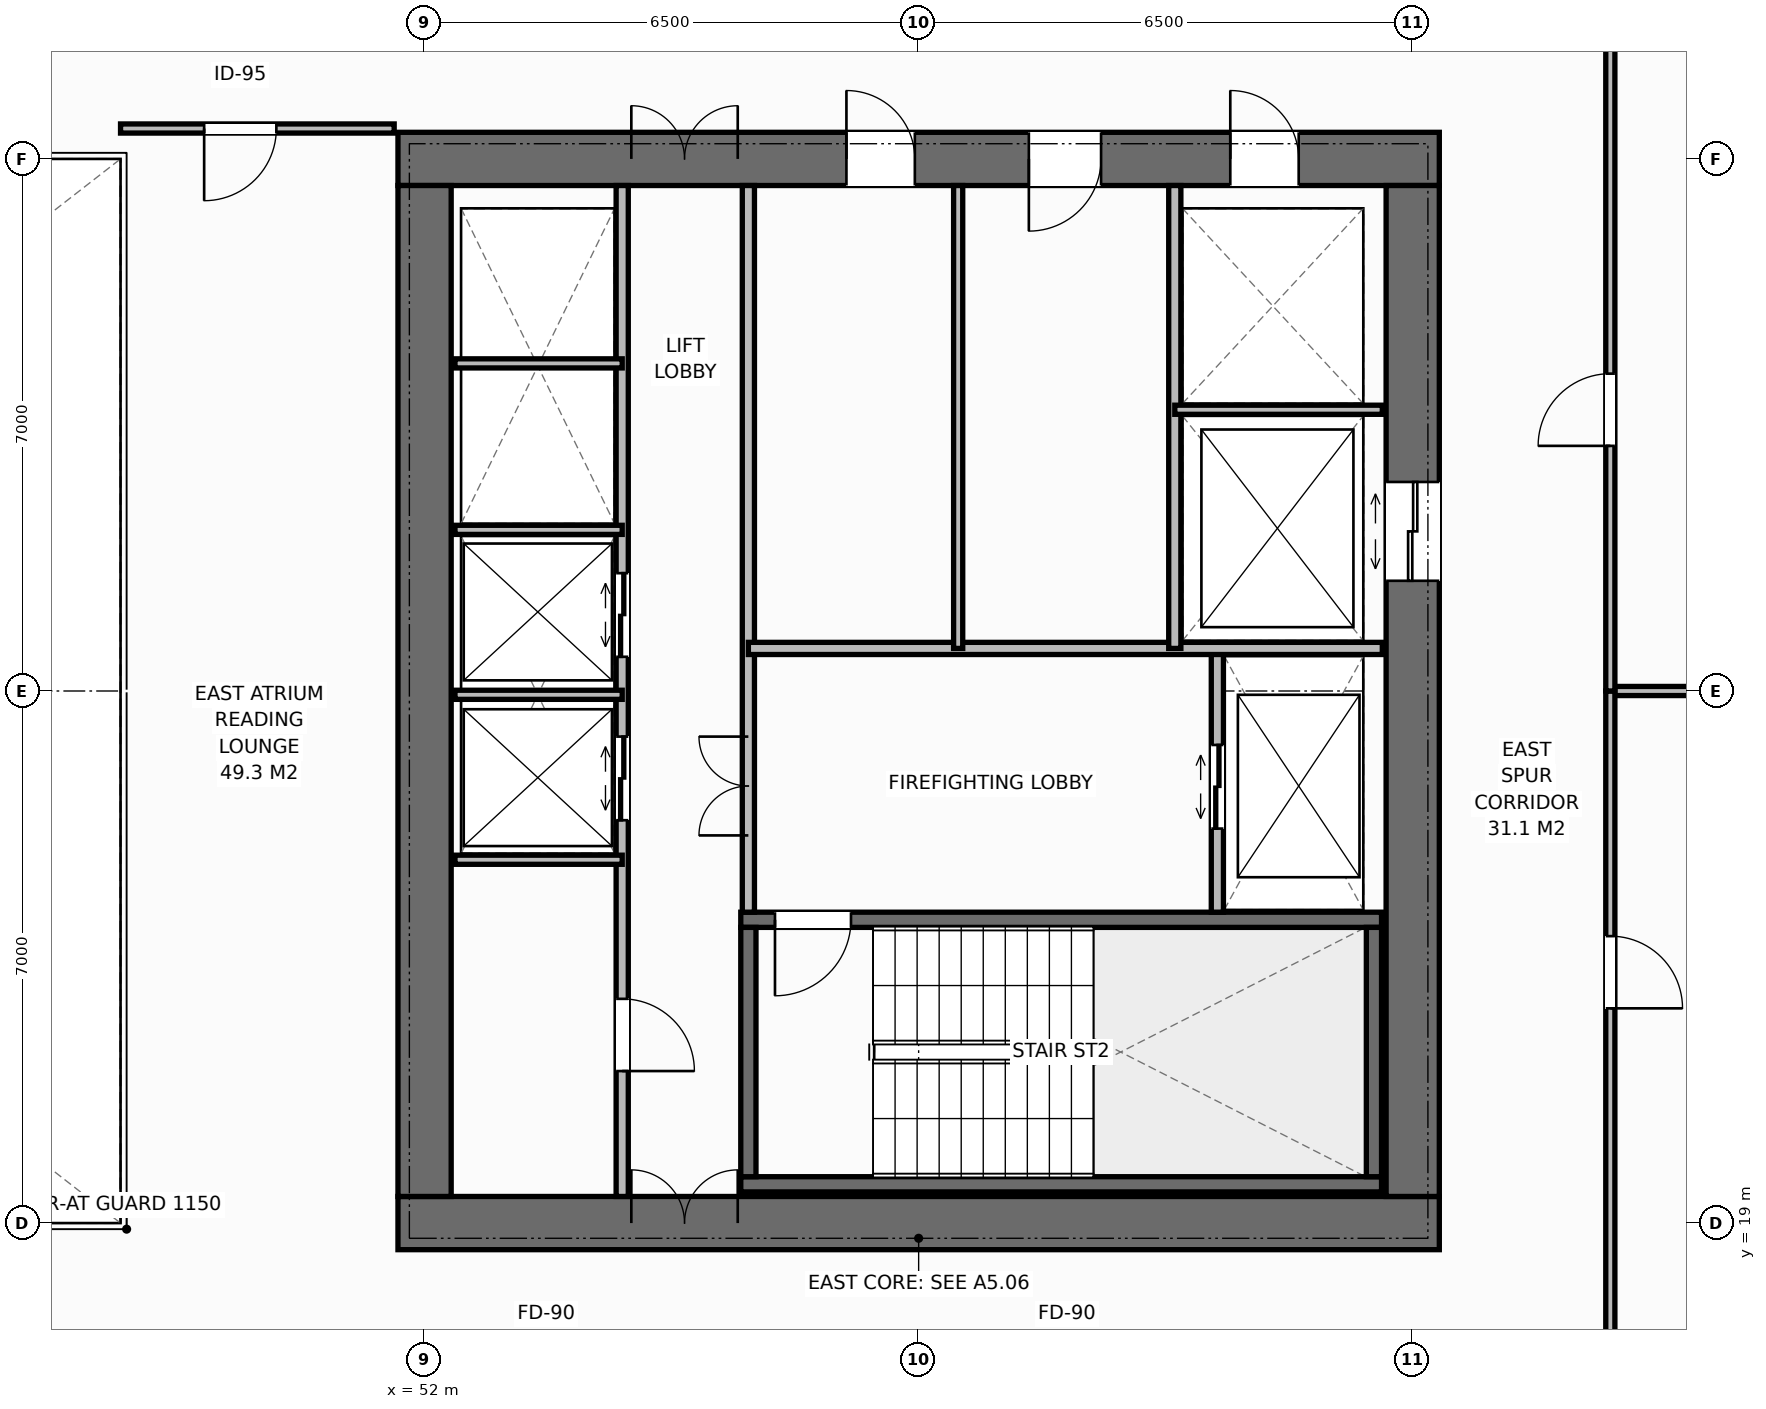
"""IFC4 building model, lengths in metres.
Left out: names, types, materials, properties, quantities, classifications, styles, units other than length and angle.
Written with IfcOpenShell. Run it as: python <this file> out.ifc"""

import sys

from ifc_helpers import new_model, si_unit, direction, frame, frame_2d, origin, place, context, subcontext, project, spatial, rectangle, extrude, element, fill, save


model = new_model("IFC4")
c1 = context("Model", 3, precision=1e-05, world=origin(), true_north=direction((0.0, 1.0)))
c2 = subcontext(c1, "Body", "Model", "MODEL_VIEW")
j1 = project(units=[si_unit("LENGTHUNIT", "METRE"), si_unit("PLANEANGLEUNIT", "RADIAN")], contexts=[c1])
p1 = place(None, origin())
s1 = spatial("IfcSite", under=j1, at=p1, CompositionType="ELEMENT")
p2 = place(p1, origin())
s2 = spatial("IfcBuilding", under=s1, at=p2, CompositionType="ELEMENT")
p3 = place(p2, frame((0.0, 0.0, 93.6)))
s3 = spatial("IfcBuildingStorey", under=s2, at=p3, CompositionType="ELEMENT", Elevation=93.6)
p4 = place(p3, frame((51.65, 19.0, 0.0), z_axis=(0.0, 0.0, 1.0), x_axis=(1.0, 0.0, 0.0)))
e1 = element("IfcWall", 1, at=p4, inside=s3, PredefinedType="SHEAR", context=c2, shape_type="SweptSolid", body=[
    extrude(rectangle(XDim=13.7, YDim=0.7, at=frame_2d((6.85, 0.0))), origin(), (0.0, 0.0, 1.0), 3.8),
])
p5 = place(p4, frame((3.07, 0.0, 0.0)))
e2 = element("IfcOpeningElement", 2, at=p5, cuts=e1, PredefinedType="OPENING", context=c2, shape_type="SweptSolid", body=[
    extrude(rectangle(XDim=1.4, YDim=2.2, at=frame_2d((0.7, 1.1))), frame((0.0, 0.36, 0.0), z_axis=(0.0, -1.0, 0.0), x_axis=(1.0, 0.0, 0.0)), (0.0, 0.0, 1.0), 0.72),
])
p6 = place(p3, frame((51.65, 33.0, 0.0), z_axis=(0.0, 0.0, 1.0), x_axis=(1.0, 0.0, 0.0)))
e3 = element("IfcWall", 3, at=p6, inside=s3, PredefinedType="SHEAR", context=c2, shape_type="SweptSolid", body=[
    extrude(rectangle(XDim=13.7, YDim=0.7, at=frame_2d((6.85, 0.0))), origin(), (0.0, 0.0, 1.0), 3.8),
])
p7 = place(p6, frame((3.07, 0.0, 0.0)))
e4 = element("IfcOpeningElement", 4, at=p7, cuts=e3, PredefinedType="OPENING", context=c2, shape_type="SweptSolid", body=[
    extrude(rectangle(XDim=1.4, YDim=2.2, at=frame_2d((0.7, 1.1))), frame((0.0, 0.36, 0.0), z_axis=(0.0, -1.0, 0.0), x_axis=(1.0, 0.0, 0.0)), (0.0, 0.0, 1.0), 0.72),
])
p8 = place(p6, frame((10.95, 0.0, 0.0)))
e5 = element("IfcOpeningElement", 5, at=p8, cuts=e3, PredefinedType="OPENING", context=c2, shape_type="SweptSolid", body=[
    extrude(rectangle(XDim=0.9, YDim=2.15, at=frame_2d((0.45, 1.075))), frame((0.0, 0.36, 0.0), z_axis=(0.0, -1.0, 0.0), x_axis=(1.0, 0.0, 0.0)), (0.0, 0.0, 1.0), 0.72),
])
p9 = place(p6, frame((5.9, 0.0, 0.0)))
e6 = element("IfcOpeningElement", 6, at=p9, cuts=e3, PredefinedType="OPENING", context=c2, shape_type="SweptSolid", body=[
    extrude(rectangle(XDim=0.9, YDim=2.15, at=frame_2d((0.45, 1.075))), frame((0.0, 0.36, 0.0), z_axis=(0.0, -1.0, 0.0), x_axis=(1.0, 0.0, 0.0)), (0.0, 0.0, 1.0), 0.72),
])
p10 = place(p6, frame((8.3, 0.0, 0.0)))
e7 = element("IfcOpeningElement", 7, at=p10, cuts=e3, PredefinedType="OPENING", context=c2, shape_type="SweptSolid", body=[
    extrude(rectangle(XDim=0.95, YDim=2.15, at=frame_2d((0.475, 1.075))), frame((0.0, 0.36, 0.0), z_axis=(0.0, -1.0, 0.0), x_axis=(1.0, 0.0, 0.0)), (0.0, 0.0, 1.0), 0.72),
])
p11 = place(p3, frame((52.0, 19.35, 0.0), z_axis=(0.0, 0.0, 1.0), x_axis=(0.0, 1.0, 0.0)))
e8 = element("IfcWall", 8, at=p11, inside=s3, PredefinedType="SHEAR", context=c2, shape_type="SweptSolid", body=[
    extrude(rectangle(XDim=13.3, YDim=0.7, at=frame_2d((6.65, 0.0))), origin(), (0.0, 0.0, 1.0), 3.8),
])
p12 = place(p3, frame((65.0, 19.35, 0.0), z_axis=(0.0, 0.0, 1.0), x_axis=(0.0, 1.0, 0.0)))
e9 = element("IfcWall", 9, at=p12, inside=s3, PredefinedType="SHEAR", context=c2, shape_type="SweptSolid", body=[
    extrude(rectangle(XDim=13.3, YDim=0.7, at=frame_2d((6.65, 0.0))), origin(), (0.0, 0.0, 1.0), 3.8),
])
p13 = place(p12, frame((8.1, 0.0, 0.0)))
e10 = element("IfcOpeningElement", 10, at=p13, cuts=e9, PredefinedType="OPENING", context=c2, shape_type="SweptSolid", body=[
    extrude(rectangle(XDim=1.3, YDim=2.2, at=frame_2d((0.65, 1.1))), frame((0.0, 0.36, 0.0), z_axis=(0.0, -1.0, 0.0), x_axis=(1.0, 0.0, 0.0)), (0.0, 0.0, 1.0), 0.72),
])
p14 = place(p3, frame((56.16, 19.51, 0.0), z_axis=(0.0, 0.0, 1.0), x_axis=(1.0, 0.0, 0.0)))
e11 = element("IfcWall", 11, at=p14, inside=s3, PredefinedType="SHEAR", context=c2, shape_type="SweptSolid", body=[
    extrude(rectangle(XDim=8.43, YDim=0.2, at=frame_2d((4.215, 0.0))), origin(), (0.0, 0.0, 1.0), 3.8),
])
p15 = place(p3, frame((56.16, 22.99, 0.0), z_axis=(0.0, 0.0, 1.0), x_axis=(1.0, 0.0, 0.0)))
e12 = element("IfcWall", 12, at=p15, inside=s3, PredefinedType="SHEAR", context=c2, shape_type="SweptSolid", body=[
    extrude(rectangle(XDim=8.43, YDim=0.2, at=frame_2d((4.215, 0.0))), origin(), (0.0, 0.0, 1.0), 3.8),
])
p16 = place(p15, frame((0.45, 0.0, 0.0)))
e13 = element("IfcOpeningElement", 13, at=p16, cuts=e12, PredefinedType="OPENING", context=c2, shape_type="SweptSolid", body=[
    extrude(rectangle(XDim=1.0, YDim=2.15, at=frame_2d((0.5, 1.075))), frame((0.0, 0.11, 0.0), z_axis=(0.0, -1.0, 0.0), x_axis=(1.0, 0.0, 0.0)), (0.0, 0.0, 1.0), 0.22),
])
for number, where, z_axis, x_axis in (
    (14, (56.26, 19.61, 0.0), (0.0, 0.0, 1.0), (0.0, 1.0, 0.0)),
    (15, (64.49, 19.61, 0.0), (0.0, 0.0, 1.0), (0.0, 1.0, 0.0)),
):
    element("IfcWall", number, at=place(p3, frame(where, z_axis=z_axis, x_axis=x_axis)), inside=s3, PredefinedType="SHEAR", context=c2, shape_type="SweptSolid", body=[
        extrude(rectangle(XDim=3.28, YDim=0.2, at=frame_2d((1.64, 0.0))), origin(), (0.0, 0.0, 1.0), 3.8),
    ])
p17 = place(p3, frame((54.6, 19.35, 0.0), z_axis=(0.0, 0.0, 1.0), x_axis=(0.0, 1.0, 0.0)))
e16 = element("IfcWall", 16, at=p17, inside=s3, PredefinedType="STANDARD", context=c2, shape_type="SweptSolid", body=[
    extrude(rectangle(XDim=13.3, YDim=0.16, at=frame_2d((6.65, 0.0))), origin(), (0.0, 0.0, 1.0), 3.565),
])
p18 = place(p17, frame((1.65, 0.0, 0.0)))
e17 = element("IfcOpeningElement", 17, at=p18, cuts=e16, PredefinedType="OPENING", context=c2, shape_type="SweptSolid", body=[
    extrude(rectangle(XDim=0.95, YDim=2.15, at=frame_2d((0.475, 1.075))), frame((0.0, 0.09, 0.0), z_axis=(0.0, -1.0, 0.0), x_axis=(1.0, 0.0, 0.0)), (0.0, 0.0, 1.0), 0.18),
])
p19 = place(p17, frame((4.95, 0.0, 0.0)))
e18 = element("IfcOpeningElement", 18, at=p19, cuts=e16, PredefinedType="OPENING", context=c2, shape_type="SweptSolid", body=[
    extrude(rectangle(XDim=1.1, YDim=2.2, at=frame_2d((0.55, 1.1))), frame((0.0, 0.09, 0.0), z_axis=(0.0, -1.0, 0.0), x_axis=(1.0, 0.0, 0.0)), (0.0, 0.0, 1.0), 0.18),
])
p20 = place(p17, frame((7.1, 0.0, 0.0)))
e19 = element("IfcOpeningElement", 19, at=p20, cuts=e16, PredefinedType="OPENING", context=c2, shape_type="SweptSolid", body=[
    extrude(rectangle(XDim=1.1, YDim=2.2, at=frame_2d((0.55, 1.1))), frame((0.0, 0.09, 0.0), z_axis=(0.0, -1.0, 0.0), x_axis=(1.0, 0.0, 0.0)), (0.0, 0.0, 1.0), 0.18),
])
p21 = place(p3, frame((56.26, 23.09, 0.0), z_axis=(0.0, 0.0, 1.0), x_axis=(0.0, 1.0, 0.0)))
e20 = element("IfcWall", 20, at=p21, inside=s3, PredefinedType="STANDARD", context=c2, shape_type="SweptSolid", body=[
    extrude(rectangle(XDim=9.56, YDim=0.16, at=frame_2d((4.78, 0.0))), origin(), (0.0, 0.0, 1.0), 3.565),
])
p22 = place(p21, frame((1.01, 0.0, 0.0)))
e21 = element("IfcOpeningElement", 21, at=p22, cuts=e20, PredefinedType="OPENING", context=c2, shape_type="SweptSolid", body=[
    extrude(rectangle(XDim=1.3, YDim=2.2, at=frame_2d((0.65, 1.1))), frame((0.0, 0.09, 0.0), z_axis=(0.0, -1.0, 0.0), x_axis=(1.0, 0.0, 0.0)), (0.0, 0.0, 1.0), 0.18),
])
for number, where, z_axis, x_axis in (
    (22, (52.4, 23.78, 0.0), (0.0, 0.0, 1.0), (1.0, 0.0, 0.0)),
    (23, (52.4, 25.95, 0.0), (0.0, 0.0, 1.0), (1.0, 0.0, 0.0)),
    (24, (52.4, 28.12, 0.0), (0.0, 0.0, 1.0), (1.0, 0.0, 0.0)),
    (25, (52.4, 30.31, 0.0), (0.0, 0.0, 1.0), (1.0, 0.0, 0.0)),
):
    element("IfcWall", number, at=place(p3, frame(where, z_axis=z_axis, x_axis=x_axis)), inside=s3, PredefinedType="PARTITIONING", context=c2, shape_type="SweptSolid", body=[
        extrude(rectangle(XDim=2.2, YDim=0.12, at=frame_2d((1.1, 0.0))), origin(), (0.0, 0.0, 1.0), 3.565),
    ])
p23 = place(p3, frame((62.43, 23.09, 0.0), z_axis=(0.0, 0.0, 1.0), x_axis=(0.0, 1.0, 0.0)))
e26 = element("IfcWall", 26, at=p23, inside=s3, PredefinedType="STANDARD", context=c2, shape_type="SweptSolid", body=[
    extrude(rectangle(XDim=3.47, YDim=0.16, at=frame_2d((1.735, 0.0))), origin(), (0.0, 0.0, 1.0), 3.565),
])
p24 = place(p23, frame((1.1, 0.0, 0.0)))
e27 = element("IfcOpeningElement", 27, at=p24, cuts=e26, PredefinedType="OPENING", context=c2, shape_type="SweptSolid", body=[
    extrude(rectangle(XDim=1.1, YDim=2.2, at=frame_2d((0.55, 1.1))), frame((0.0, 0.09, 0.0), z_axis=(0.0, -1.0, 0.0), x_axis=(1.0, 0.0, 0.0)), (0.0, 0.0, 1.0), 0.18),
])
p25 = place(p3, frame((56.26, 26.56, 0.0), z_axis=(0.0, 0.0, 1.0), x_axis=(1.0, 0.0, 0.0)))
e28 = element("IfcWall", 28, at=p25, inside=s3, PredefinedType="STANDARD", context=c2, shape_type="SweptSolid", body=[
    extrude(rectangle(XDim=8.34, YDim=0.16, at=frame_2d((4.17, 0.0))), origin(), (0.0, 0.0, 1.0), 3.565),
])
p26 = place(p3, frame((61.87, 26.56, 0.0), z_axis=(0.0, 0.0, 1.0), x_axis=(0.0, 1.0, 0.0)))
e29 = element("IfcWall", 29, at=p26, inside=s3, PredefinedType="STANDARD", context=c2, shape_type="SweptSolid", body=[
    extrude(rectangle(XDim=6.09, YDim=0.16, at=frame_2d((3.045, 0.0))), origin(), (0.0, 0.0, 1.0), 3.565),
])
p27 = place(p3, frame((61.87, 29.7, 0.0), z_axis=(0.0, 0.0, 1.0), x_axis=(1.0, 0.0, 0.0)))
e30 = element("IfcWall", 30, at=p27, inside=s3, PredefinedType="PARTITIONING", context=c2, shape_type="SweptSolid", body=[
    extrude(rectangle(XDim=2.73, YDim=0.12, at=frame_2d((1.365, 0.0))), origin(), (0.0, 0.0, 1.0), 3.565),
])
p28 = place(p3, frame((59.02, 26.56, 0.0), z_axis=(0.0, 0.0, 1.0), x_axis=(0.0, 1.0, 0.0)))
e31 = element("IfcWall", 31, at=p28, inside=s3, PredefinedType="PARTITIONING", context=c2, shape_type="SweptSolid", body=[
    extrude(rectangle(XDim=6.09, YDim=0.12, at=frame_2d((3.045, 0.0))), origin(), (0.0, 0.0, 1.0), 3.565),
])
p29 = place(p3, frame((48.0, 33.4, 0.0), z_axis=(0.0, 0.0, 1.0), x_axis=(1.0, 0.0, 0.0)))
e32 = element("IfcWall", 32, at=p29, inside=s3, PredefinedType="PARTITIONING", context=c2, shape_type="SweptSolid", body=[
    extrude(rectangle(XDim=3.6, YDim=0.12, at=frame_2d((1.8, 0.0))), origin(), (0.0, 0.0, 1.0), 3.565),
])
p30 = place(p29, frame((1.1, 0.0, 0.0)))
e33 = element("IfcOpeningElement", 33, at=p30, cuts=e32, PredefinedType="OPENING", context=c2, shape_type="SweptSolid", body=[
    extrude(rectangle(XDim=0.95, YDim=2.15, at=frame_2d((0.475, 1.075))), frame((0.0, 0.07, 0.0), z_axis=(0.0, -1.0, 0.0), x_axis=(1.0, 0.0, 0.0)), (0.0, 0.0, 1.0), 0.14),
])
p31 = place(p3, frame((67.6, 26.0, 0.0), z_axis=(0.0, 0.0, 1.0), x_axis=(1.0, 0.0, 0.0)))
e34 = element("IfcWall", 34, at=p31, inside=s3, PredefinedType="PARTITIONING", context=c2, shape_type="SweptSolid", body=[
    extrude(rectangle(XDim=8.58, YDim=0.12, at=frame_2d((4.29, 0.0))), origin(), (0.0, 0.0, 1.0), 3.565),
])
p32 = place(p3, frame((67.6, 16.5, 0.0), z_axis=(0.0, 0.0, 1.0), x_axis=(0.0, 1.0, 0.0)))
e35 = element("IfcWall", 35, at=p32, inside=s3, PredefinedType="PARTITIONING", context=c2, shape_type="SweptSolid", body=[
    extrude(rectangle(XDim=9.5, YDim=0.12, at=frame_2d((4.75, 0.0))), origin(), (0.0, 0.0, 1.0), 3.565),
])
p33 = place(p32, frame((5.325, 0.0, 0.0)))
e36 = element("IfcOpeningElement", 36, at=p33, cuts=e35, PredefinedType="OPENING", context=c2, shape_type="SweptSolid", body=[
    extrude(rectangle(XDim=0.95, YDim=2.15, at=frame_2d((0.475, 1.075))), frame((0.0, 0.07, 0.0), z_axis=(0.0, -1.0, 0.0), x_axis=(1.0, 0.0, 0.0)), (0.0, 0.0, 1.0), 0.14),
])
p34 = place(p3, frame((67.6, 26.0, 0.0), z_axis=(0.0, 0.0, 1.0), x_axis=(0.0, 1.0, 0.0)))
e37 = element("IfcWall", 37, at=p34, inside=s3, PredefinedType="PARTITIONING", context=c2, shape_type="SweptSolid", body=[
    extrude(rectangle(XDim=9.5, YDim=0.12, at=frame_2d((4.75, 0.0))), origin(), (0.0, 0.0, 1.0), 3.565),
])
p35 = place(p34, frame((3.225, 0.0, 0.0)))
e38 = element("IfcOpeningElement", 38, at=p35, cuts=e37, PredefinedType="OPENING", context=c2, shape_type="SweptSolid", body=[
    extrude(rectangle(XDim=0.95, YDim=2.15, at=frame_2d((0.475, 1.075))), frame((0.0, 0.07, 0.0), z_axis=(0.0, -1.0, 0.0), x_axis=(1.0, 0.0, 0.0)), (0.0, 0.0, 1.0), 0.14),
])
p36 = place(p5, origin())
e39 = element("IfcDoor", 39, at=p36, inside=s3, OperationType="DOUBLE_DOOR_SINGLE_SWING", PredefinedType="DOOR", context=c2, shape_type="SweptSolid", body=[
    extrude(rectangle(XDim=1.4, YDim=2.2, at=frame_2d((0.7, 1.1))), frame((0.0, 0.125, 0.0), z_axis=(0.0, -1.0, 0.0), x_axis=(1.0, 0.0, 0.0)), (0.0, 0.0, 1.0), 0.05),
])
fill(e2, e39)
p37 = place(p7, origin())
e40 = element("IfcDoor", 40, at=p37, inside=s3, OperationType="DOUBLE_DOOR_SINGLE_SWING", PredefinedType="DOOR", context=c2, shape_type="SweptSolid", body=[
    extrude(rectangle(XDim=1.4, YDim=2.2, at=frame_2d((0.7, 1.1))), frame((0.0, -0.075, 0.0), z_axis=(0.0, -1.0, 0.0), x_axis=(1.0, 0.0, 0.0)), (0.0, 0.0, 1.0), 0.05),
])
fill(e4, e40)
p38 = place(p18, origin())
e41 = element("IfcDoor", 41, at=p38, inside=s3, OperationType="SINGLE_SWING_RIGHT", PredefinedType="DOOR", context=c2, shape_type="SweptSolid", body=[
    extrude(rectangle(XDim=0.95, YDim=2.15, at=frame_2d((0.475, 1.075))), frame((0.0, 0.025, 0.0), z_axis=(0.0, -1.0, 0.0), x_axis=(1.0, 0.0, 0.0)), (0.0, 0.0, 1.0), 0.05),
])
fill(e17, e41)
p39 = place(p19, origin())
e42 = element("IfcDoor", 42, at=p39, inside=s3, OperationType="DOUBLE_DOOR_SLIDING", PredefinedType="DOOR", context=c2, shape_type="SweptSolid", body=[
    extrude(rectangle(XDim=1.1, YDim=2.2, at=frame_2d((0.55, 1.1))), frame((0.0, 0.025, 0.0), z_axis=(0.0, -1.0, 0.0), x_axis=(1.0, 0.0, 0.0)), (0.0, 0.0, 1.0), 0.05),
])
fill(e18, e42)
p40 = place(p20, origin())
e43 = element("IfcDoor", 43, at=p40, inside=s3, OperationType="DOUBLE_DOOR_SLIDING", PredefinedType="DOOR", context=c2, shape_type="SweptSolid", body=[
    extrude(rectangle(XDim=1.1, YDim=2.2, at=frame_2d((0.55, 1.1))), frame((0.0, 0.025, 0.0), z_axis=(0.0, -1.0, 0.0), x_axis=(1.0, 0.0, 0.0)), (0.0, 0.0, 1.0), 0.05),
])
fill(e19, e43)
p41 = place(p16, origin())
e44 = element("IfcDoor", 44, at=p41, inside=s3, OperationType="SINGLE_SWING_RIGHT", PredefinedType="DOOR", context=c2, shape_type="SweptSolid", body=[
    extrude(rectangle(XDim=1.0, YDim=2.15, at=frame_2d((0.5, 1.075))), frame((0.0, 0.025, 0.0), z_axis=(0.0, -1.0, 0.0), x_axis=(1.0, 0.0, 0.0)), (0.0, 0.0, 1.0), 0.05),
])
fill(e13, e44)
p42 = place(p24, origin())
e45 = element("IfcDoor", 45, at=p42, inside=s3, OperationType="DOUBLE_DOOR_SLIDING", PredefinedType="DOOR", context=c2, shape_type="SweptSolid", body=[
    extrude(rectangle(XDim=1.1, YDim=2.2, at=frame_2d((0.55, 1.1))), frame((0.0, 0.025, 0.0), z_axis=(0.0, -1.0, 0.0), x_axis=(1.0, 0.0, 0.0)), (0.0, 0.0, 1.0), 0.05),
])
fill(e27, e45)
p43 = place(p22, origin())
e46 = element("IfcDoor", 46, at=p43, inside=s3, OperationType="DOUBLE_DOOR_SINGLE_SWING", PredefinedType="DOOR", context=c2, shape_type="SweptSolid", body=[
    extrude(rectangle(XDim=1.3, YDim=2.2, at=frame_2d((0.65, 1.1))), frame((0.0, 0.025, 0.0), z_axis=(0.0, -1.0, 0.0), x_axis=(1.0, 0.0, 0.0)), (0.0, 0.0, 1.0), 0.05),
])
fill(e21, e46)
p44 = place(p13, origin())
e47 = element("IfcDoor", 47, at=p44, inside=s3, OperationType="DOUBLE_DOOR_SLIDING", PredefinedType="DOOR", context=c2, shape_type="SweptSolid", body=[
    extrude(rectangle(XDim=1.3, YDim=2.2, at=frame_2d((0.65, 1.1))), frame((0.0, 0.025, 0.0), z_axis=(0.0, -1.0, 0.0), x_axis=(1.0, 0.0, 0.0)), (0.0, 0.0, 1.0), 0.05),
])
fill(e10, e47)
p45 = place(p8, origin())
e48 = element("IfcDoor", 48, at=p45, inside=s3, OperationType="SINGLE_SWING_LEFT", PredefinedType="DOOR", context=c2, shape_type="SweptSolid", body=[
    extrude(rectangle(XDim=0.9, YDim=2.15, at=frame_2d((0.45, 1.075))), frame((0.0, -0.075, 0.0), z_axis=(0.0, -1.0, 0.0), x_axis=(1.0, 0.0, 0.0)), (0.0, 0.0, 1.0), 0.05),
])
fill(e5, e48)
p46 = place(p9, origin())
e49 = element("IfcDoor", 49, at=p46, inside=s3, OperationType="SINGLE_SWING_LEFT", PredefinedType="DOOR", context=c2, shape_type="SweptSolid", body=[
    extrude(rectangle(XDim=0.9, YDim=2.15, at=frame_2d((0.45, 1.075))), frame((0.0, -0.075, 0.0), z_axis=(0.0, -1.0, 0.0), x_axis=(1.0, 0.0, 0.0)), (0.0, 0.0, 1.0), 0.05),
])
fill(e6, e49)
p47 = place(p10, origin())
e50 = element("IfcDoor", 50, at=p47, inside=s3, OperationType="SINGLE_SWING_RIGHT", PredefinedType="DOOR", context=c2, shape_type="SweptSolid", body=[
    extrude(rectangle(XDim=0.95, YDim=2.15, at=frame_2d((0.475, 1.075))), frame((0.0, -0.075, 0.0), z_axis=(0.0, -1.0, 0.0), x_axis=(1.0, 0.0, 0.0)), (0.0, 0.0, 1.0), 0.05),
])
fill(e7, e50)
p48 = place(p30, origin())
e51 = element("IfcDoor", 51, at=p48, inside=s3, OperationType="SINGLE_SWING_RIGHT", PredefinedType="DOOR", context=c2, shape_type="SweptSolid", body=[
    extrude(rectangle(XDim=0.95, YDim=2.15, at=frame_2d((0.475, 1.075))), frame((0.0, 0.025, 0.0), z_axis=(0.0, -1.0, 0.0), x_axis=(1.0, 0.0, 0.0)), (0.0, 0.0, 1.0), 0.05),
])
fill(e33, e51)
p49 = place(p33, origin())
e52 = element("IfcDoor", 52, at=p49, inside=s3, OperationType="SINGLE_SWING_RIGHT", PredefinedType="DOOR", context=c2, shape_type="SweptSolid", body=[
    extrude(rectangle(XDim=0.95, YDim=2.15, at=frame_2d((0.475, 1.075))), frame((0.0, 0.025, 0.0), z_axis=(0.0, -1.0, 0.0), x_axis=(1.0, 0.0, 0.0)), (0.0, 0.0, 1.0), 0.05),
])
fill(e36, e52)
p50 = place(p35, origin())
e53 = element("IfcDoor", 53, at=p50, inside=s3, OperationType="SINGLE_SWING_LEFT", PredefinedType="DOOR", context=c2, shape_type="SweptSolid", body=[
    extrude(rectangle(XDim=0.95, YDim=2.15, at=frame_2d((0.475, 1.075))), frame((0.0, 0.025, 0.0), z_axis=(0.0, -1.0, 0.0), x_axis=(1.0, 0.0, 0.0)), (0.0, 0.0, 1.0), 0.05),
])
fill(e38, e53)
save(model, sys.argv[1])
